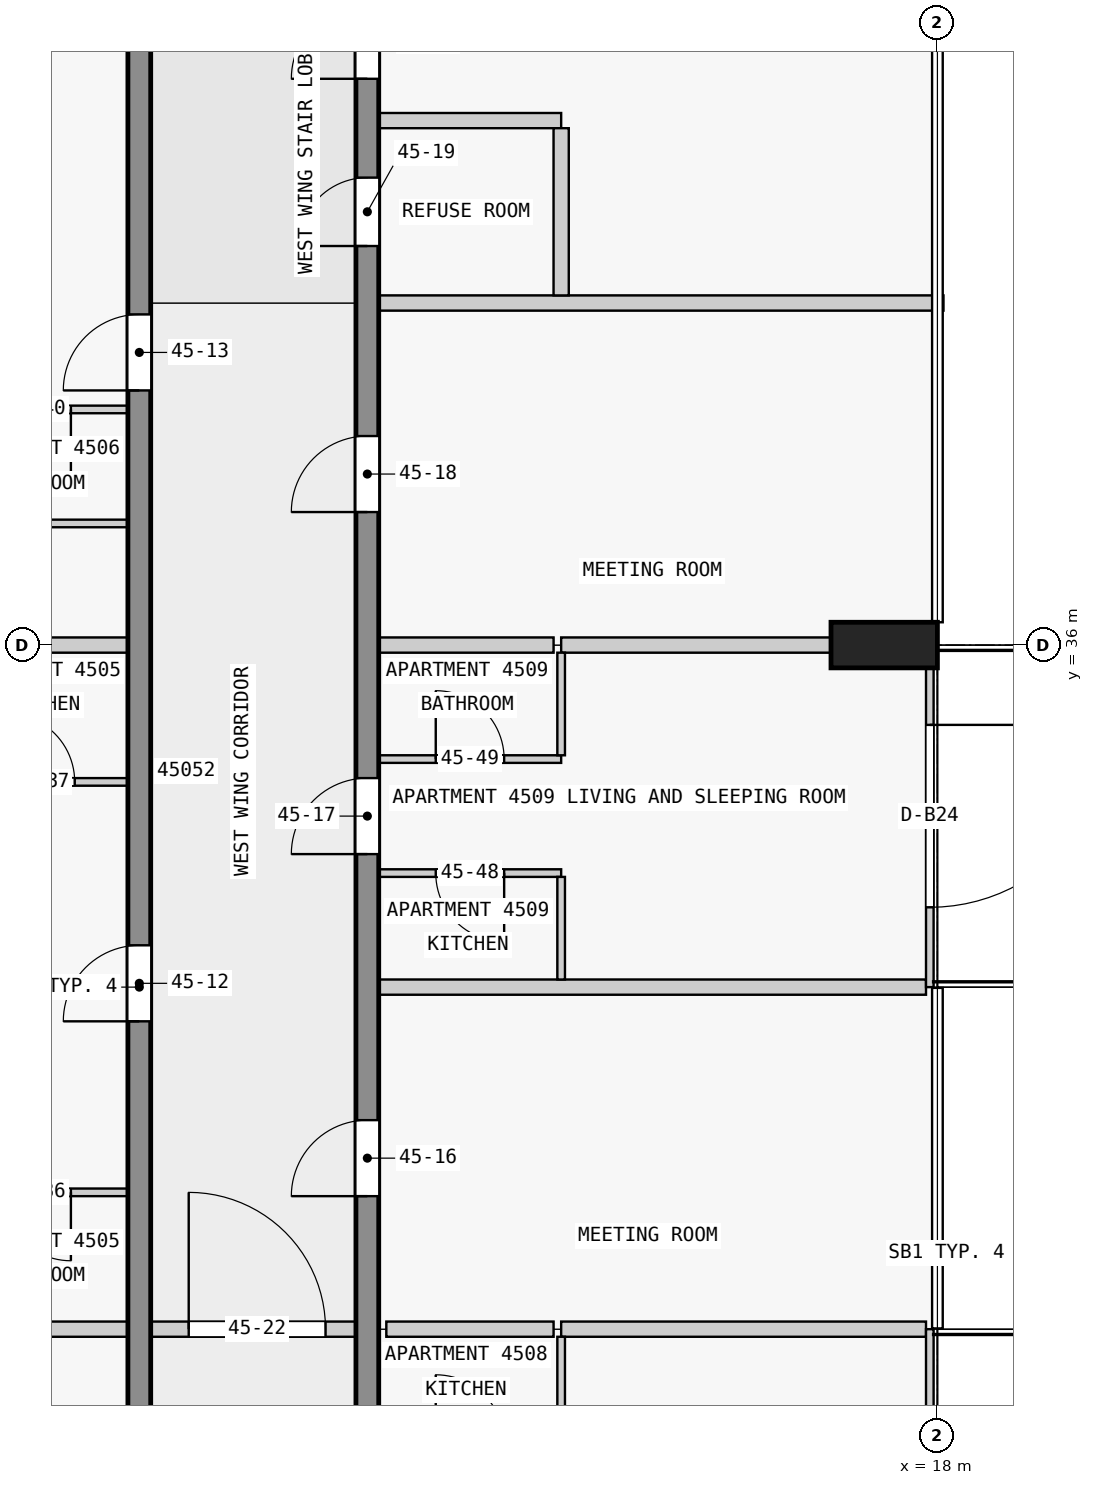
"""IFC4 building model, lengths in metres.
Left out: names, types, materials, properties, quantities, classifications, styles, units other than length and angle.
Written with IfcOpenShell. Run it as: python <this file> out.ifc"""

import sys

from ifc_helpers import new_model, si_unit, direction, frame, frame_2d, origin, origin_2d, place, context, subcontext, project, spatial, rectangle, extrude, element, fill, save


model = new_model("IFC4")
c1 = context("Model", 3, precision=1e-05, world=origin(), true_north=direction((0.0, 1.0)))
c2 = subcontext(c1, "Body", "Model", "MODEL_VIEW")
j1 = project(units=[si_unit("LENGTHUNIT", "METRE"), si_unit("PLANEANGLEUNIT", "RADIAN")], contexts=[c1])
p1 = place(None, origin())
s1 = spatial("IfcSite", under=j1, at=p1, CompositionType="ELEMENT")
p2 = place(p1, origin())
s2 = spatial("IfcBuilding", under=s1, at=p2, CompositionType="ELEMENT")
p3 = place(p2, frame((0.0, 0.0, 174.4)))
s3 = spatial("IfcBuildingStorey", under=s2, at=p3, CompositionType="ELEMENT", Elevation=174.4)
p4 = place(p3, frame((17.3, 36.0, 0.0), z_axis=(0.0, 0.0, 1.0), x_axis=(0.0, 1.0, 0.0)))
e1 = element("IfcColumn", 1, at=p4, inside=s3, PredefinedType="COLUMN", context=c2, shape_type="SweptSolid", body=[
    extrude(rectangle(XDim=0.6, YDim=1.4, at=origin_2d()), origin(), (0.0, 0.0, 1.0), 3.5),
])
p5 = place(p3, frame((7.5, 18.0, 0.0), z_axis=(0.0, 0.0, 1.0), x_axis=(0.0, 1.0, 0.0)))
e2 = element("IfcWall", 2, at=p5, inside=s3, PredefinedType="SHEAR", context=c2, shape_type="SweptSolid", body=[
    extrude(rectangle(XDim=27.0, YDim=0.3, at=frame_2d((13.5, 0.0))), origin(), (0.0, 0.0, 1.0), 3.25),
])
p6 = place(p5, frame((1.75, 0.0, 0.0)))
e3 = element("IfcOpeningElement", 3, at=p6, cuts=e2, PredefinedType="OPENING", context=c2, shape_type="SweptSolid", body=[
    extrude(rectangle(XDim=1.0, YDim=2.1, at=frame_2d((0.5, 1.05))), frame((0.0, 0.16, 0.0), z_axis=(0.0, -1.0, 0.0), x_axis=(1.0, 0.0, 0.0)), (0.0, 0.0, 1.0), 0.32),
])
p7 = place(p5, frame((5.85, 0.0, 0.0)))
e4 = element("IfcOpeningElement", 4, at=p7, cuts=e2, PredefinedType="OPENING", context=c2, shape_type="SweptSolid", body=[
    extrude(rectangle(XDim=1.8, YDim=2.1, at=frame_2d((0.9, 1.05))), frame((0.0, 0.16, 0.0), z_axis=(0.0, -1.0, 0.0), x_axis=(1.0, 0.0, 0.0)), (0.0, 0.0, 1.0), 0.32),
])
p8 = place(p5, frame((13.05, 0.0, 0.0)))
e5 = element("IfcOpeningElement", 5, at=p8, cuts=e2, PredefinedType="OPENING", context=c2, shape_type="SweptSolid", body=[
    extrude(rectangle(XDim=1.0, YDim=2.1, at=frame_2d((0.5, 1.05))), frame((0.0, 0.16, 0.0), z_axis=(0.0, -1.0, 0.0), x_axis=(1.0, 0.0, 0.0)), (0.0, 0.0, 1.0), 0.32),
])
p9 = place(p5, frame((21.35, 0.0, 0.0)))
e6 = element("IfcOpeningElement", 6, at=p9, cuts=e2, PredefinedType="OPENING", context=c2, shape_type="SweptSolid", body=[
    extrude(rectangle(XDim=1.0, YDim=2.1, at=frame_2d((0.5, 1.05))), frame((0.0, 0.16, 0.0), z_axis=(0.0, -1.0, 0.0), x_axis=(1.0, 0.0, 0.0)), (0.0, 0.0, 1.0), 0.32),
])
p10 = place(p3, frame((10.5, 18.0, 0.0), z_axis=(0.0, 0.0, 1.0), x_axis=(0.0, 1.0, 0.0)))
e7 = element("IfcWall", 7, at=p10, inside=s3, PredefinedType="SHEAR", context=c2, shape_type="SweptSolid", body=[
    extrude(rectangle(XDim=27.0, YDim=0.3, at=frame_2d((13.5, 0.0))), origin(), (0.0, 0.0, 1.0), 3.25),
])
p11 = place(p10, frame((1.75, 0.0, 0.0)))
e8 = element("IfcOpeningElement", 8, at=p11, cuts=e7, PredefinedType="OPENING", context=c2, shape_type="SweptSolid", body=[
    extrude(rectangle(XDim=1.0, YDim=2.1, at=frame_2d((0.5, 1.05))), frame((0.0, 0.16, 0.0), z_axis=(0.0, -1.0, 0.0), x_axis=(1.0, 0.0, 0.0)), (0.0, 0.0, 1.0), 0.32),
])
p12 = place(p10, frame((6.25, 0.0, 0.0)))
e9 = element("IfcOpeningElement", 9, at=p12, cuts=e7, PredefinedType="OPENING", context=c2, shape_type="SweptSolid", body=[
    extrude(rectangle(XDim=1.0, YDim=2.1, at=frame_2d((0.5, 1.05))), frame((0.0, 0.16, 0.0), z_axis=(0.0, -1.0, 0.0), x_axis=(1.0, 0.0, 0.0)), (0.0, 0.0, 1.0), 0.32),
])
p13 = place(p10, frame((10.75, 0.0, 0.0)))
e10 = element("IfcOpeningElement", 10, at=p13, cuts=e7, PredefinedType="OPENING", context=c2, shape_type="SweptSolid", body=[
    extrude(rectangle(XDim=1.0, YDim=2.1, at=frame_2d((0.5, 1.05))), frame((0.0, 0.16, 0.0), z_axis=(0.0, -1.0, 0.0), x_axis=(1.0, 0.0, 0.0)), (0.0, 0.0, 1.0), 0.32),
])
p14 = place(p10, frame((15.25, 0.0, 0.0)))
e11 = element("IfcOpeningElement", 11, at=p14, cuts=e7, PredefinedType="OPENING", context=c2, shape_type="SweptSolid", body=[
    extrude(rectangle(XDim=1.0, YDim=2.1, at=frame_2d((0.5, 1.05))), frame((0.0, 0.16, 0.0), z_axis=(0.0, -1.0, 0.0), x_axis=(1.0, 0.0, 0.0)), (0.0, 0.0, 1.0), 0.32),
])
p15 = place(p10, frame((19.75, 0.0, 0.0)))
e12 = element("IfcOpeningElement", 12, at=p15, cuts=e7, PredefinedType="OPENING", context=c2, shape_type="SweptSolid", body=[
    extrude(rectangle(XDim=1.0, YDim=2.1, at=frame_2d((0.5, 1.05))), frame((0.0, 0.16, 0.0), z_axis=(0.0, -1.0, 0.0), x_axis=(1.0, 0.0, 0.0)), (0.0, 0.0, 1.0), 0.32),
])
p16 = place(p10, frame((23.25, 0.0, 0.0)))
e13 = element("IfcOpeningElement", 13, at=p16, cuts=e7, PredefinedType="OPENING", context=c2, shape_type="SweptSolid", body=[
    extrude(rectangle(XDim=0.9, YDim=2.1, at=frame_2d((0.45, 1.05))), frame((0.0, 0.16, 0.0), z_axis=(0.0, -1.0, 0.0), x_axis=(1.0, 0.0, 0.0)), (0.0, 0.0, 1.0), 0.32),
])
p17 = place(p10, frame((25.45, 0.0, 0.0)))
e14 = element("IfcOpeningElement", 14, at=p17, cuts=e7, PredefinedType="OPENING", context=c2, shape_type="SweptSolid", body=[
    extrude(rectangle(XDim=1.0, YDim=2.1, at=frame_2d((0.5, 1.05))), frame((0.0, 0.16, 0.0), z_axis=(0.0, -1.0, 0.0), x_axis=(1.0, 0.0, 0.0)), (0.0, 0.0, 1.0), 0.32),
])
p18 = place(p3, frame((17.9, 27.0, 0.0), z_axis=(0.0, 0.0, 1.0), x_axis=(0.0, -1.0, 0.0)))
e15 = element("IfcWall", 15, at=p18, inside=s3, PredefinedType="STANDARD", context=c2, shape_type="SweptSolid", body=[
    extrude(rectangle(XDim=4.5, YDim=0.1, at=frame_2d((2.25, 0.0))), origin(), (0.0, 0.0, 1.0), 3.25),
])
p19 = place(p18, frame((1.05, 0.0, 0.0)))
e16 = element("IfcOpeningElement", 16, at=p19, cuts=e15, PredefinedType="OPENING", context=c2, shape_type="SweptSolid", body=[
    extrude(rectangle(XDim=2.4, YDim=2.4, at=frame_2d((1.2, 1.2))), frame((0.0, 0.06, 0.0), z_axis=(0.0, -1.0, 0.0), x_axis=(1.0, 0.0, 0.0)), (0.0, 0.0, 1.0), 0.12),
])
p20 = place(p3, frame((17.9, 36.0, 0.0), z_axis=(0.0, 0.0, 1.0), x_axis=(0.0, -1.0, 0.0)))
e17 = element("IfcWall", 17, at=p20, inside=s3, PredefinedType="STANDARD", context=c2, shape_type="SweptSolid", body=[
    extrude(rectangle(XDim=4.5, YDim=0.1, at=frame_2d((2.25, 0.0))), origin(), (0.0, 0.0, 1.0), 3.25),
])
p21 = place(p20, frame((1.05, 0.0, 0.0)))
e18 = element("IfcOpeningElement", 18, at=p21, cuts=e17, PredefinedType="OPENING", context=c2, shape_type="SweptSolid", body=[
    extrude(rectangle(XDim=2.4, YDim=2.4, at=frame_2d((1.2, 1.2))), frame((0.0, 0.06, 0.0), z_axis=(0.0, -1.0, 0.0), x_axis=(1.0, 0.0, 0.0)), (0.0, 0.0, 1.0), 0.12),
])
p22 = place(p3, frame((7.35, 27.0, 0.0), z_axis=(0.0, 0.0, 1.0), x_axis=(-1.0, 0.0, 0.0)))
e19 = element("IfcWall", 19, at=p22, inside=s3, PredefinedType="PARTITIONING", context=c2, shape_type="SweptSolid", body=[
    extrude(rectangle(XDim=7.43, YDim=0.2, at=frame_2d((3.715, 0.0))), origin(), (0.0, 0.0, 1.0), 3.25),
])
p23 = place(p3, frame((12.95, 27.0, 0.0), z_axis=(0.0, 0.0, 1.0), x_axis=(-1.0, 0.0, 0.0)))
e20 = element("IfcWall", 20, at=p23, inside=s3, PredefinedType="PARTITIONING", context=c2, shape_type="SweptSolid", body=[
    extrude(rectangle(XDim=2.2, YDim=0.2, at=frame_2d((1.1, 0.0))), origin(), (0.0, 0.0, 1.0), 3.25),
])
p24 = place(p3, frame((13.05, 27.0, 0.0), z_axis=(0.0, 0.0, 1.0), x_axis=(1.0, 0.0, 0.0)))
e21 = element("IfcWall", 21, at=p24, inside=s3, PredefinedType="PARTITIONING", context=c2, shape_type="SweptSolid", body=[
    extrude(rectangle(XDim=4.8, YDim=0.2, at=frame_2d((2.4, 0.0))), origin(), (0.0, 0.0, 1.0), 3.25),
])
p25 = place(p3, frame((7.35, 28.8, 0.0), z_axis=(0.0, 0.0, 1.0), x_axis=(-1.0, 0.0, 0.0)))
e22 = element("IfcWall", 22, at=p25, inside=s3, PredefinedType="PARTITIONING", context=c2, shape_type="SweptSolid", body=[
    extrude(rectangle(XDim=2.35, YDim=0.1, at=frame_2d((1.175, 0.0))), origin(), (0.0, 0.0, 1.0), 3.25),
])
p26 = place(p25, frame((0.75, 0.0, 0.0)))
e23 = element("IfcOpeningElement", 23, at=p26, cuts=e22, PredefinedType="OPENING", context=c2, shape_type="SweptSolid", body=[
    extrude(rectangle(XDim=0.9, YDim=2.1, at=frame_2d((0.45, 1.05))), frame((0.0, 0.06, 0.0), z_axis=(0.0, -1.0, 0.0), x_axis=(1.0, 0.0, 0.0)), (0.0, 0.0, 1.0), 0.12),
])
p27 = place(p3, frame((17.85, 31.5, 0.0), z_axis=(0.0, 0.0, 1.0), x_axis=(-1.0, 0.0, 0.0)))
e24 = element("IfcWall", 24, at=p27, inside=s3, PredefinedType="PARTITIONING", context=c2, shape_type="SweptSolid", body=[
    extrude(rectangle(XDim=7.2, YDim=0.2, at=frame_2d((3.6, 0.0))), origin(), (0.0, 0.0, 1.0), 3.25),
])
p28 = place(p3, frame((13.05, 33.0, 0.0), z_axis=(0.0, 0.0, 1.0), x_axis=(-1.0, 0.0, 0.0)))
e25 = element("IfcWall", 25, at=p28, inside=s3, PredefinedType="PARTITIONING", context=c2, shape_type="SweptSolid", body=[
    extrude(rectangle(XDim=2.4, YDim=0.1, at=frame_2d((1.2, 0.0))), origin(), (0.0, 0.0, 1.0), 3.25),
])
p29 = place(p28, frame((0.75, 0.0, 0.0)))
e26 = element("IfcOpeningElement", 26, at=p29, cuts=e25, PredefinedType="OPENING", context=c2, shape_type="SweptSolid", body=[
    extrude(rectangle(XDim=0.9, YDim=2.1, at=frame_2d((0.45, 1.05))), frame((0.0, 0.06, 0.0), z_axis=(0.0, -1.0, 0.0), x_axis=(1.0, 0.0, 0.0)), (0.0, 0.0, 1.0), 0.12),
])
p30 = place(p3, frame((5.0, 34.2, 0.0), z_axis=(0.0, 0.0, 1.0), x_axis=(1.0, 0.0, 0.0)))
e27 = element("IfcWall", 27, at=p30, inside=s3, PredefinedType="PARTITIONING", context=c2, shape_type="SweptSolid", body=[
    extrude(rectangle(XDim=2.35, YDim=0.1, at=frame_2d((1.175, 0.0))), origin(), (0.0, 0.0, 1.0), 3.25),
])
p31 = place(p30, frame((0.75, 0.0, 0.0)))
e28 = element("IfcOpeningElement", 28, at=p31, cuts=e27, PredefinedType="OPENING", context=c2, shape_type="SweptSolid", body=[
    extrude(rectangle(XDim=0.9, YDim=2.1, at=frame_2d((0.45, 1.05))), frame((0.0, 0.06, 0.0), z_axis=(0.0, -1.0, 0.0), x_axis=(1.0, 0.0, 0.0)), (0.0, 0.0, 1.0), 0.12),
])
p32 = place(p3, frame((10.65, 34.5, 0.0), z_axis=(0.0, 0.0, 1.0), x_axis=(1.0, 0.0, 0.0)))
e29 = element("IfcWall", 29, at=p32, inside=s3, PredefinedType="PARTITIONING", context=c2, shape_type="SweptSolid", body=[
    extrude(rectangle(XDim=2.4, YDim=0.1, at=frame_2d((1.2, 0.0))), origin(), (0.0, 0.0, 1.0), 3.25),
])
p33 = place(p32, frame((0.75, 0.0, 0.0)))
e30 = element("IfcOpeningElement", 30, at=p33, cuts=e29, PredefinedType="OPENING", context=c2, shape_type="SweptSolid", body=[
    extrude(rectangle(XDim=0.9, YDim=2.1, at=frame_2d((0.45, 1.05))), frame((0.0, 0.06, 0.0), z_axis=(0.0, -1.0, 0.0), x_axis=(1.0, 0.0, 0.0)), (0.0, 0.0, 1.0), 0.12),
])
for number, where, z_axis, x_axis in (
    (31, (7.35, 36.0, 0.0), (0.0, 0.0, 1.0), (-1.0, 0.0, 0.0)),
    (32, (12.95, 36.0, 0.0), (0.0, 0.0, 1.0), (-1.0, 0.0, 0.0)),
):
    element("IfcWall", number, at=place(p3, frame(where, z_axis=z_axis, x_axis=x_axis)), inside=s3, PredefinedType="PARTITIONING", context=c2, shape_type="SweptSolid", body=[
        extrude(rectangle(XDim=2.3, YDim=0.2, at=frame_2d((1.15, 0.0))), origin(), (0.0, 0.0, 1.0), 3.25),
    ])
p34 = place(p3, frame((13.05, 36.0, 0.0), z_axis=(0.0, 0.0, 1.0), x_axis=(1.0, 0.0, 0.0)))
e33 = element("IfcWall", 33, at=p34, inside=s3, PredefinedType="PARTITIONING", context=c2, shape_type="SweptSolid", body=[
    extrude(rectangle(XDim=3.55, YDim=0.2, at=frame_2d((1.775, 0.0))), origin(), (0.0, 0.0, 1.0), 3.25),
])
p35 = place(p3, frame((7.35, 37.6, 0.0), z_axis=(0.0, 0.0, 1.0), x_axis=(-1.0, 0.0, 0.0)))
e34 = element("IfcWall", 34, at=p35, inside=s3, PredefinedType="PARTITIONING", context=c2, shape_type="SweptSolid", body=[
    extrude(rectangle(XDim=2.35, YDim=0.1, at=frame_2d((1.175, 0.0))), origin(), (0.0, 0.0, 1.0), 3.25),
])
p36 = place(p3, frame((7.35, 39.1, 0.0), z_axis=(0.0, 0.0, 1.0), x_axis=(-1.0, 0.0, 0.0)))
e35 = element("IfcWall", 35, at=p36, inside=s3, PredefinedType="PARTITIONING", context=c2, shape_type="SweptSolid", body=[
    extrude(rectangle(XDim=2.35, YDim=0.1, at=frame_2d((1.175, 0.0))), origin(), (0.0, 0.0, 1.0), 3.25),
])
p37 = place(p36, frame((0.75, 0.0, 0.0)))
e36 = element("IfcOpeningElement", 36, at=p37, cuts=e35, PredefinedType="OPENING", context=c2, shape_type="SweptSolid", body=[
    extrude(rectangle(XDim=0.9, YDim=2.1, at=frame_2d((0.45, 1.05))), frame((0.0, 0.06, 0.0), z_axis=(0.0, -1.0, 0.0), x_axis=(1.0, 0.0, 0.0)), (0.0, 0.0, 1.0), 0.12),
])
p38 = place(p3, frame((18.08, 40.5, 0.0), z_axis=(0.0, 0.0, 1.0), x_axis=(-1.0, 0.0, 0.0)))
e37 = element("IfcWall", 37, at=p38, inside=s3, PredefinedType="PARTITIONING", context=c2, shape_type="SweptSolid", body=[
    extrude(rectangle(XDim=7.43, YDim=0.2, at=frame_2d((3.715, 0.0))), origin(), (0.0, 0.0, 1.0), 3.25),
])
p39 = place(p3, frame((13.05, 42.9, 0.0), z_axis=(0.0, 0.0, 1.0), x_axis=(-1.0, 0.0, 0.0)))
e38 = element("IfcWall", 38, at=p39, inside=s3, PredefinedType="PARTITIONING", context=c2, shape_type="SweptSolid", body=[
    extrude(rectangle(XDim=2.4, YDim=0.2, at=frame_2d((1.2, 0.0))), origin(), (0.0, 0.0, 1.0), 3.25),
])
for number, where, z_axis, x_axis in (
    (39, (13.05, 25.55, 0.0), (0.0, 0.0, 1.0), (0.0, 1.0, 0.0)),
    (40, (13.05, 31.6, 0.0), (0.0, 0.0, 1.0), (0.0, 1.0, 0.0)),
    (41, (13.05, 34.55, 0.0), (0.0, 0.0, 1.0), (0.0, 1.0, 0.0)),
):
    element("IfcWall", number, at=place(p3, frame(where, z_axis=z_axis, x_axis=x_axis)), inside=s3, PredefinedType="PARTITIONING", context=c2, shape_type="SweptSolid", body=[
        extrude(rectangle(XDim=1.35, YDim=0.1, at=frame_2d((0.675, 0.0))), origin(), (0.0, 0.0, 1.0), 3.25),
    ])
p40 = place(p3, frame((13.05, 40.6, 0.0), z_axis=(0.0, 0.0, 1.0), x_axis=(0.0, 1.0, 0.0)))
e42 = element("IfcWall", 42, at=p40, inside=s3, PredefinedType="PARTITIONING", context=c2, shape_type="SweptSolid", body=[
    extrude(rectangle(XDim=2.2, YDim=0.2, at=frame_2d((1.1, 0.0))), origin(), (0.0, 0.0, 1.0), 3.25),
])
p41 = place(p3, frame((7.45, 27.0, 0.0), z_axis=(0.0, 0.0, 1.0), x_axis=(1.0, 0.0, 0.0)))
e43 = element("IfcWall", 43, at=p41, inside=s3, PredefinedType="PARTITIONING", context=c2, shape_type="SweptSolid", body=[
    extrude(rectangle(XDim=3.2, YDim=0.2, at=frame_2d((1.6, 0.0))), origin(), (0.0, 0.0, 1.0), 3.25),
])
p42 = place(p41, frame((0.7, 0.0, 0.0)))
e44 = element("IfcOpeningElement", 44, at=p42, cuts=e43, PredefinedType="OPENING", context=c2, shape_type="SweptSolid", body=[
    extrude(rectangle(XDim=1.8, YDim=2.1, at=frame_2d((0.9, 1.05))), frame((0.0, 0.11, 0.0), z_axis=(0.0, -1.0, 0.0), x_axis=(1.0, 0.0, 0.0)), (0.0, 0.0, 1.0), 0.22),
])
p43 = place(p21, origin())
e45 = element("IfcDoor", 45, at=p43, inside=s3, OperationType="SINGLE_SWING_LEFT", PredefinedType="DOOR", context=c2, shape_type="SweptSolid", body=[
    extrude(rectangle(XDim=2.4, YDim=2.4, at=frame_2d((1.2, 1.2))), frame((0.0, 0.025, 0.0), z_axis=(0.0, -1.0, 0.0), x_axis=(1.0, 0.0, 0.0)), (0.0, 0.0, 1.0), 0.05),
])
fill(e18, e45)
p44 = place(p8, origin())
e46 = element("IfcDoor", 46, at=p44, inside=s3, OperationType="SINGLE_SWING_RIGHT", PredefinedType="DOOR", context=c2, shape_type="SweptSolid", body=[
    extrude(rectangle(XDim=1.0, YDim=2.1, at=frame_2d((0.5, 1.05))), frame((0.0, 0.025, 0.0), z_axis=(0.0, -1.0, 0.0), x_axis=(1.0, 0.0, 0.0)), (0.0, 0.0, 1.0), 0.05),
])
fill(e5, e46)
p45 = place(p9, origin())
e47 = element("IfcDoor", 47, at=p45, inside=s3, OperationType="SINGLE_SWING_RIGHT", PredefinedType="DOOR", context=c2, shape_type="SweptSolid", body=[
    extrude(rectangle(XDim=1.0, YDim=2.1, at=frame_2d((0.5, 1.05))), frame((0.0, 0.025, 0.0), z_axis=(0.0, -1.0, 0.0), x_axis=(1.0, 0.0, 0.0)), (0.0, 0.0, 1.0), 0.05),
])
fill(e6, e47)
p46 = place(p13, origin())
e48 = element("IfcDoor", 48, at=p46, inside=s3, OperationType="SINGLE_SWING_LEFT", PredefinedType="DOOR", context=c2, shape_type="SweptSolid", body=[
    extrude(rectangle(XDim=1.0, YDim=2.1, at=frame_2d((0.5, 1.05))), frame((0.0, 0.025, 0.0), z_axis=(0.0, -1.0, 0.0), x_axis=(1.0, 0.0, 0.0)), (0.0, 0.0, 1.0), 0.05),
])
fill(e10, e48)
p47 = place(p14, origin())
e49 = element("IfcDoor", 49, at=p47, inside=s3, OperationType="SINGLE_SWING_RIGHT", PredefinedType="DOOR", context=c2, shape_type="SweptSolid", body=[
    extrude(rectangle(XDim=1.0, YDim=2.1, at=frame_2d((0.5, 1.05))), frame((0.0, 0.025, 0.0), z_axis=(0.0, -1.0, 0.0), x_axis=(1.0, 0.0, 0.0)), (0.0, 0.0, 1.0), 0.05),
])
fill(e11, e49)
p48 = place(p15, origin())
e50 = element("IfcDoor", 50, at=p48, inside=s3, OperationType="SINGLE_SWING_RIGHT", PredefinedType="DOOR", context=c2, shape_type="SweptSolid", body=[
    extrude(rectangle(XDim=1.0, YDim=2.1, at=frame_2d((0.5, 1.05))), frame((0.0, 0.025, 0.0), z_axis=(0.0, -1.0, 0.0), x_axis=(1.0, 0.0, 0.0)), (0.0, 0.0, 1.0), 0.05),
])
fill(e12, e50)
p49 = place(p16, origin())
e51 = element("IfcDoor", 51, at=p49, inside=s3, OperationType="SINGLE_SWING_RIGHT", PredefinedType="DOOR", context=c2, shape_type="SweptSolid", body=[
    extrude(rectangle(XDim=0.9, YDim=2.1, at=frame_2d((0.45, 1.05))), frame((0.0, 0.025, 0.0), z_axis=(0.0, -1.0, 0.0), x_axis=(1.0, 0.0, 0.0)), (0.0, 0.0, 1.0), 0.05),
])
fill(e13, e51)
p50 = place(p17, origin())
e52 = element("IfcDoor", 52, at=p50, inside=s3, OperationType="SINGLE_SWING_RIGHT", PredefinedType="DOOR", context=c2, shape_type="SweptSolid", body=[
    extrude(rectangle(XDim=1.0, YDim=2.1, at=frame_2d((0.5, 1.05))), frame((0.0, 0.025, 0.0), z_axis=(0.0, -1.0, 0.0), x_axis=(1.0, 0.0, 0.0)), (0.0, 0.0, 1.0), 0.05),
])
fill(e14, e52)
p51 = place(p42, origin())
e53 = element("IfcDoor", 53, at=p51, inside=s3, OperationType="SINGLE_SWING_LEFT", PredefinedType="DOOR", context=c2, shape_type="SweptSolid", body=[
    extrude(rectangle(XDim=1.8, YDim=2.1, at=frame_2d((0.9, 1.05))), frame((0.0, 0.025, 0.0), z_axis=(0.0, -1.0, 0.0), x_axis=(1.0, 0.0, 0.0)), (0.0, 0.0, 1.0), 0.05),
])
fill(e44, e53)
p52 = place(p26, origin())
e54 = element("IfcDoor", 54, at=p52, inside=s3, OperationType="SINGLE_SWING_RIGHT", PredefinedType="DOOR", context=c2, shape_type="SweptSolid", body=[
    extrude(rectangle(XDim=0.9, YDim=2.1, at=frame_2d((0.45, 1.05))), frame((0.0, 0.025, 0.0), z_axis=(0.0, -1.0, 0.0), x_axis=(1.0, 0.0, 0.0)), (0.0, 0.0, 1.0), 0.05),
])
fill(e23, e54)
p53 = place(p31, origin())
e55 = element("IfcDoor", 55, at=p53, inside=s3, OperationType="SINGLE_SWING_RIGHT", PredefinedType="DOOR", context=c2, shape_type="SweptSolid", body=[
    extrude(rectangle(XDim=0.9, YDim=2.1, at=frame_2d((0.45, 1.05))), frame((0.0, 0.025, 0.0), z_axis=(0.0, -1.0, 0.0), x_axis=(1.0, 0.0, 0.0)), (0.0, 0.0, 1.0), 0.05),
])
fill(e28, e55)
p54 = place(p37, origin())
e56 = element("IfcDoor", 56, at=p54, inside=s3, OperationType="SINGLE_SWING_RIGHT", PredefinedType="DOOR", context=c2, shape_type="SweptSolid", body=[
    extrude(rectangle(XDim=0.9, YDim=2.1, at=frame_2d((0.45, 1.05))), frame((0.0, 0.025, 0.0), z_axis=(0.0, -1.0, 0.0), x_axis=(1.0, 0.0, 0.0)), (0.0, 0.0, 1.0), 0.05),
])
fill(e36, e56)
p55 = place(p29, origin())
e57 = element("IfcDoor", 57, at=p55, inside=s3, OperationType="SINGLE_SWING_LEFT", PredefinedType="DOOR", context=c2, shape_type="SweptSolid", body=[
    extrude(rectangle(XDim=0.9, YDim=2.1, at=frame_2d((0.45, 1.05))), frame((0.0, 0.025, 0.0), z_axis=(0.0, -1.0, 0.0), x_axis=(1.0, 0.0, 0.0)), (0.0, 0.0, 1.0), 0.05),
])
fill(e26, e57)
p56 = place(p33, origin())
e58 = element("IfcDoor", 58, at=p56, inside=s3, OperationType="SINGLE_SWING_LEFT", PredefinedType="DOOR", context=c2, shape_type="SweptSolid", body=[
    extrude(rectangle(XDim=0.9, YDim=2.1, at=frame_2d((0.45, 1.05))), frame((0.0, 0.025, 0.0), z_axis=(0.0, -1.0, 0.0), x_axis=(1.0, 0.0, 0.0)), (0.0, 0.0, 1.0), 0.05),
])
fill(e30, e58)
save(model, sys.argv[1])
